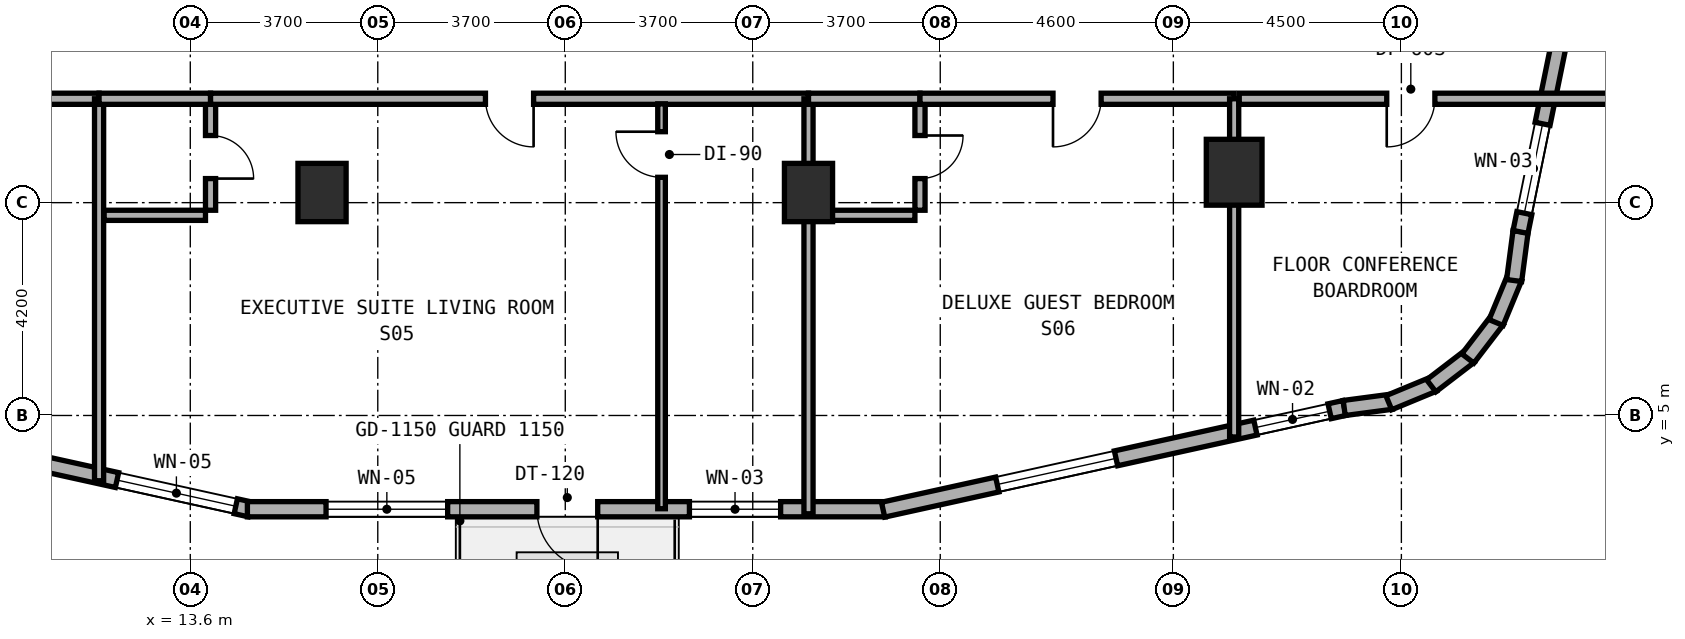
"""IFC4 building model, lengths in metres.
Left out: names, types, materials, properties, quantities, classifications, styles, units other than length and angle.
Written with IfcOpenShell. Run it as: python <this file> out.ifc"""

import sys

from ifc_helpers import new_model, si_unit, direction, frame, frame_2d, origin, origin_2d, place, context, subcontext, project, spatial, rectangle, extrude, element, fill, save


model = new_model("IFC4")
c1 = context("Model", 3, precision=1e-05, world=origin(), true_north=direction((0.0, 1.0)))
c2 = subcontext(c1, "Body", "Model", "MODEL_VIEW")
j1 = project(units=[si_unit("LENGTHUNIT", "METRE"), si_unit("PLANEANGLEUNIT", "RADIAN")], contexts=[c1])
p1 = place(None, origin())
s1 = spatial("IfcSite", under=j1, at=p1, CompositionType="ELEMENT")
p2 = place(p1, origin())
s2 = spatial("IfcBuilding", under=s1, at=p2, CompositionType="ELEMENT")
p3 = place(p2, frame((0.0, 0.0, 48.5)))
s3 = spatial("IfcBuildingStorey", under=s2, at=p3, CompositionType="ELEMENT", Elevation=48.5)
for number, where, z_axis, x_axis in (
    (1, (16.2, 9.4, 0.0), (0.0, 0.0, 1.0), (1.0, 0.0, 0.0)),
    (2, (25.8, 9.4, 0.0), (0.0, 0.0, 1.0), (1.0, 0.0, 0.0)),
):
    element("IfcColumn", number, at=place(p3, frame(where, z_axis=z_axis, x_axis=x_axis)), inside=s3, PredefinedType="COLUMN", context=c2, shape_type="SweptSolid", body=[
        extrude(rectangle(XDim=0.95, YDim=1.15, at=origin_2d()), origin(), (0.0, 0.0, 1.0), 3.5),
    ])
p4 = place(p3, frame((34.2, 9.8, 0.0), z_axis=(0.0, 0.0, 1.0), x_axis=(1.0, 0.0, 0.0)))
e3 = element("IfcColumn", 3, at=p4, inside=s3, PredefinedType="COLUMN", context=c2, shape_type="SweptSolid", body=[
    extrude(rectangle(XDim=1.1, YDim=1.3, at=origin_2d()), origin(), (0.0, 0.0, 1.0), 3.5),
])
p5 = place(p3, frame((5.704, 5.148, 0.0), z_axis=(0.0, 0.0, 1.0), x_axis=(0.976539545934, -0.215338141596, 0.0)))
e4 = element("IfcWall", 4, at=p5, inside=s3, PredefinedType="STANDARD", context=c2, shape_type="SweptSolid", body=[
    extrude(rectangle(XDim=9.288, YDim=0.3, at=frame_2d((4.644, 0.0))), origin(), (0.0, 0.0, 1.0), 3.22),
])
p6 = place(p5, frame((1.856, 0.0, 0.8)))
e5 = element("IfcOpeningElement", 5, at=p6, cuts=e4, PredefinedType="OPENING", context=c2, shape_type="SweptSolid", body=[
    extrude(rectangle(XDim=2.4, YDim=1.6, at=frame_2d((1.2, 0.8))), frame((0.0, 0.16, 0.0), z_axis=(0.0, -1.0, 0.0), x_axis=(1.0, 0.0, 0.0)), (0.0, 0.0, 1.0), 0.32),
])
p7 = place(p5, frame((6.605, 0.0, 0.8)))
e6 = element("IfcOpeningElement", 6, at=p7, cuts=e4, PredefinedType="OPENING", context=c2, shape_type="SweptSolid", body=[
    extrude(rectangle(XDim=2.4, YDim=1.6, at=frame_2d((1.2, 0.8))), frame((0.0, 0.16, 0.0), z_axis=(0.0, -1.0, 0.0), x_axis=(1.0, 0.0, 0.0)), (0.0, 0.0, 1.0), 0.32),
])
p8 = place(p3, frame((14.727, 3.15, 0.0), z_axis=(0.0, 0.0, 1.0), x_axis=(1.0, 0.0, 0.0)))
e7 = element("IfcWall", 7, at=p8, inside=s3, PredefinedType="STANDARD", context=c2, shape_type="SweptSolid", body=[
    extrude(rectangle(XDim=12.591, YDim=0.3, at=frame_2d((6.295, 0.0))), origin(), (0.0, 0.0, 1.0), 3.22),
])
p9 = place(p8, frame((5.713, 0.0, 0.0)))
e8 = element("IfcOpeningElement", 8, at=p9, cuts=e7, PredefinedType="OPENING", context=c2, shape_type="SweptSolid", body=[
    extrude(rectangle(XDim=1.2, YDim=2.15, at=frame_2d((0.6, 1.075))), frame((0.0, 0.16, 0.0), z_axis=(0.0, -1.0, 0.0), x_axis=(1.0, 0.0, 0.0)), (0.0, 0.0, 1.0), 0.32),
])
p10 = place(p8, frame((1.552, 0.0, 0.8)))
e9 = element("IfcOpeningElement", 9, at=p10, cuts=e7, PredefinedType="OPENING", context=c2, shape_type="SweptSolid", body=[
    extrude(rectangle(XDim=2.4, YDim=1.6, at=frame_2d((1.2, 0.8))), frame((0.0, 0.16, 0.0), z_axis=(0.0, -1.0, 0.0), x_axis=(1.0, 0.0, 0.0)), (0.0, 0.0, 1.0), 0.32),
])
p11 = place(p8, frame((8.723, 0.0, 0.85)))
e10 = element("IfcOpeningElement", 10, at=p11, cuts=e7, PredefinedType="OPENING", context=c2, shape_type="SweptSolid", body=[
    extrude(rectangle(XDim=1.8, YDim=1.5, at=frame_2d((0.9, 0.75))), frame((0.0, 0.16, 0.0), z_axis=(0.0, -1.0, 0.0), x_axis=(1.0, 0.0, 0.0)), (0.0, 0.0, 1.0), 0.32),
])
p12 = place(p3, frame((27.272, 3.141, 0.0), z_axis=(0.0, 0.0, 1.0), x_axis=(0.976555357219, 0.21526642629, 0.0)))
e11 = element("IfcWall", 11, at=p12, inside=s3, PredefinedType="STANDARD", context=c2, shape_type="SweptSolid", body=[
    extrude(rectangle(XDim=9.323, YDim=0.3, at=frame_2d((4.661, 0.0))), origin(), (0.0, 0.0, 1.0), 3.22),
])
p13 = place(p12, frame((2.307, 0.0, 0.8)))
e12 = element("IfcOpeningElement", 12, at=p13, cuts=e11, PredefinedType="OPENING", context=c2, shape_type="SweptSolid", body=[
    extrude(rectangle(XDim=2.4, YDim=1.6, at=frame_2d((1.2, 0.8))), frame((0.0, 0.16, 0.0), z_axis=(0.0, -1.0, 0.0), x_axis=(1.0, 0.0, 0.0)), (0.0, 0.0, 1.0), 0.32),
])
p14 = place(p12, frame((7.524, 0.0, 0.85)))
e13 = element("IfcOpeningElement", 13, at=p14, cuts=e11, PredefinedType="OPENING", context=c2, shape_type="SweptSolid", body=[
    extrude(rectangle(XDim=1.5, YDim=1.5, at=frame_2d((0.75, 0.75))), frame((0.0, 0.16, 0.0), z_axis=(0.0, -1.0, 0.0), x_axis=(1.0, 0.0, 0.0)), (0.0, 0.0, 1.0), 0.32),
])
p15 = place(p3, frame((36.372, 5.148, 0.0), z_axis=(0.0, 0.0, 1.0), x_axis=(0.991359246108, 0.131174864804, 0.0)))
e14 = element("IfcWall", 14, at=p15, inside=s3, PredefinedType="STANDARD", context=c2, shape_type="SweptSolid", body=[
    extrude(rectangle(XDim=0.938, YDim=0.3, at=frame_2d((0.469, 0.0))), origin(), (0.0, 0.0, 1.0), 3.22),
])
p16 = place(p3, frame((37.252, 5.252, 0.0), z_axis=(0.0, 0.0, 1.0), x_axis=(0.924019948111, 0.382344263057, 0.0)))
e15 = element("IfcWall", 15, at=p16, inside=s3, PredefinedType="STANDARD", context=c2, shape_type="SweptSolid", body=[
    extrude(rectangle(XDim=0.955, YDim=0.3, at=frame_2d((0.477, 0.0))), origin(), (0.0, 0.0, 1.0), 3.22),
])
p17 = place(p3, frame((38.089, 5.586, 0.0), z_axis=(0.0, 0.0, 1.0), x_axis=(0.793573440799, 0.608474481025, 0.0)))
e16 = element("IfcWall", 16, at=p17, inside=s3, PredefinedType="STANDARD", context=c2, shape_type="SweptSolid", body=[
    extrude(rectangle(XDim=0.955, YDim=0.3, at=frame_2d((0.478, 0.0))), origin(), (0.0, 0.0, 1.0), 3.22),
])
p18 = place(p3, frame((38.812, 6.125, 0.0), z_axis=(0.0, 0.0, 1.0), x_axis=(0.608351047625, 0.793668068435, 0.0)))
e17 = element("IfcWall", 17, at=p18, inside=s3, PredefinedType="STANDARD", context=c2, shape_type="SweptSolid", body=[
    extrude(rectangle(XDim=0.955, YDim=0.3, at=frame_2d((0.478, 0.0))), origin(), (0.0, 0.0, 1.0), 3.22),
])
p19 = place(p3, frame((39.369, 6.834, 0.0), z_axis=(0.0, 0.0, 1.0), x_axis=(0.382344263057, 0.924019948111, 0.0)))
e18 = element("IfcWall", 18, at=p19, inside=s3, PredefinedType="STANDARD", context=c2, shape_type="SweptSolid", body=[
    extrude(rectangle(XDim=0.955, YDim=0.3, at=frame_2d((0.477, 0.0))), origin(), (0.0, 0.0, 1.0), 3.22),
])
p20 = place(p3, frame((39.725, 7.663, 0.0), z_axis=(0.0, 0.0, 1.0), x_axis=(0.130454512571, 0.991454295543, 0.0)))
e19 = element("IfcWall", 19, at=p20, inside=s3, PredefinedType="STANDARD", context=c2, shape_type="SweptSolid", body=[
    extrude(rectangle(XDim=0.973, YDim=0.3, at=frame_2d((0.487, 0.0))), origin(), (0.0, 0.0, 1.0), 3.22),
])
p21 = place(p3, frame((39.851, 8.622, 0.0), z_axis=(0.0, 0.0, 1.0), x_axis=(0.199990901713, 0.979797754249, 0.0)))
e20 = element("IfcWall", 20, at=p21, inside=s3, PredefinedType="STANDARD", context=c2, shape_type="SweptSolid", body=[
    extrude(rectangle(XDim=10.065, YDim=0.3, at=frame_2d((5.033, 0.0))), origin(), (0.0, 0.0, 1.0), 3.22),
])
p22 = place(p21, frame((0.378, 0.0, 0.85)))
e21 = element("IfcOpeningElement", 21, at=p22, cuts=e20, PredefinedType="OPENING", context=c2, shape_type="SweptSolid", body=[
    extrude(rectangle(XDim=1.8, YDim=1.5, at=frame_2d((0.9, 0.75))), frame((0.0, 0.16, 0.0), z_axis=(0.0, -1.0, 0.0), x_axis=(1.0, 0.0, 0.0)), (0.0, 0.0, 1.0), 0.32),
])
p23 = place(p21, frame((5.236, 0.0, 0.8)))
e22 = element("IfcOpeningElement", 22, at=p23, cuts=e20, PredefinedType="OPENING", context=c2, shape_type="SweptSolid", body=[
    extrude(rectangle(XDim=2.4, YDim=1.6, at=frame_2d((1.2, 0.8))), frame((0.0, 0.16, 0.0), z_axis=(0.0, -1.0, 0.0), x_axis=(1.0, 0.0, 0.0)), (0.0, 0.0, 1.0), 0.32),
])
p24 = place(p3, frame((5.55, 11.25, 0.0), z_axis=(0.0, 0.0, 1.0), x_axis=(1.0, 0.0, 0.0)))
e23 = element("IfcWall", 23, at=p24, inside=s3, PredefinedType="SOLIDWALL", context=c2, shape_type="SweptSolid", body=[
    extrude(rectangle(XDim=6.25, YDim=0.22, at=frame_2d((3.125, 0.0))), origin(), (0.0, 0.0, 1.0), 2.395),
])
p25 = place(p24, frame((3.21, 0.0, 0.0)))
e24 = element("IfcOpeningElement", 24, at=p25, cuts=e23, PredefinedType="OPENING", context=c2, shape_type="SweptSolid", body=[
    extrude(rectangle(XDim=0.95, YDim=2.1, at=frame_2d((0.475, 1.05))), frame((0.0, 0.12, 0.0), z_axis=(0.0, -1.0, 0.0), x_axis=(1.0, 0.0, 0.0)), (0.0, 0.0, 1.0), 0.24),
])
p26 = place(p3, frame((11.8, 3.712, 0.0), z_axis=(0.0, 0.0, 1.0), x_axis=(0.0, 1.0, 0.0)))
e25 = element("IfcWall", 25, at=p26, inside=s3, PredefinedType="SOLIDWALL", context=c2, shape_type="SweptSolid", body=[
    extrude(rectangle(XDim=7.538, YDim=0.18, at=frame_2d((3.769, 0.0))), origin(), (0.0, 0.0, 1.0), 2.745),
])
p27 = place(p3, frame((14.0, 9.05, 0.0), z_axis=(0.0, 0.0, 1.0), x_axis=(0.0, 1.0, 0.0)))
e26 = element("IfcWall", 26, at=p27, inside=s3, PredefinedType="PLUMBINGWALL", context=c2, shape_type="SweptSolid", body=[
    extrude(rectangle(XDim=2.1, YDim=0.2, at=frame_2d((1.05, 0.0))), origin(), (0.0, 0.0, 1.0), 2.745),
])
p28 = place(p27, frame((0.625, 0.0, 0.0)))
e27 = element("IfcOpeningElement", 27, at=p28, cuts=e26, PredefinedType="OPENING", context=c2, shape_type="SweptSolid", body=[
    extrude(rectangle(XDim=0.85, YDim=2.1, at=frame_2d((0.425, 1.05))), frame((0.0, 0.11, 0.0), z_axis=(0.0, -1.0, 0.0), x_axis=(1.0, 0.0, 0.0)), (0.0, 0.0, 1.0), 0.22),
])
p29 = place(p3, frame((11.9, 8.95, 0.0), z_axis=(0.0, 0.0, 1.0), x_axis=(1.0, 0.0, 0.0)))
e28 = element("IfcWall", 28, at=p29, inside=s3, PredefinedType="PLUMBINGWALL", context=c2, shape_type="SweptSolid", body=[
    extrude(rectangle(XDim=2.0, YDim=0.2, at=frame_2d((1.0, 0.0))), origin(), (0.0, 0.0, 1.0), 3.22),
])
p30 = place(p3, frame((11.8, 11.25, 0.0), z_axis=(0.0, 0.0, 1.0), x_axis=(1.0, 0.0, 0.0)))
e29 = element("IfcWall", 29, at=p30, inside=s3, PredefinedType="SOLIDWALL", context=c2, shape_type="SweptSolid", body=[
    extrude(rectangle(XDim=2.2, YDim=0.22, at=frame_2d((1.1, 0.0))), origin(), (0.0, 0.0, 1.0), 2.955),
])
p31 = place(p3, frame((14.0, 11.25, 0.0), z_axis=(0.0, 0.0, 1.0), x_axis=(1.0, 0.0, 0.0)))
e30 = element("IfcWall", 30, at=p31, inside=s3, PredefinedType="SOLIDWALL", context=c2, shape_type="SweptSolid", body=[
    extrude(rectangle(XDim=11.8, YDim=0.22, at=frame_2d((5.9, 0.0))), origin(), (0.0, 0.0, 1.0), 2.395),
])
p32 = place(p31, frame((5.425, 0.0, 0.0)))
e31 = element("IfcOpeningElement", 31, at=p32, cuts=e30, PredefinedType="OPENING", context=c2, shape_type="SweptSolid", body=[
    extrude(rectangle(XDim=0.95, YDim=2.1, at=frame_2d((0.475, 1.05))), frame((0.0, 0.12, 0.0), z_axis=(0.0, -1.0, 0.0), x_axis=(1.0, 0.0, 0.0)), (0.0, 0.0, 1.0), 0.24),
])
p33 = place(p3, frame((22.9, 3.16, 0.0), z_axis=(0.0, 0.0, 1.0), x_axis=(0.0, 1.0, 0.0)))
e32 = element("IfcWall", 32, at=p33, inside=s3, PredefinedType="PARTITIONING", context=c2, shape_type="SweptSolid", body=[
    extrude(rectangle(XDim=7.99, YDim=0.15, at=frame_2d((3.995, 0.0))), origin(), (0.0, 0.0, 1.0), 2.745),
])
p34 = place(p33, frame((6.54, 0.0, 0.0)))
e33 = element("IfcOpeningElement", 33, at=p34, cuts=e32, PredefinedType="OPENING", context=c2, shape_type="SweptSolid", body=[
    extrude(rectangle(XDim=0.9, YDim=2.1, at=frame_2d((0.45, 1.05))), frame((0.0, 0.085, 0.0), z_axis=(0.0, -1.0, 0.0), x_axis=(1.0, 0.0, 0.0)), (0.0, 0.0, 1.0), 0.17),
])
p35 = place(p3, frame((25.8, 3.06, 0.0), z_axis=(0.0, 0.0, 1.0), x_axis=(0.0, 1.0, 0.0)))
e34 = element("IfcWall", 34, at=p35, inside=s3, PredefinedType="SOLIDWALL", context=c2, shape_type="SweptSolid", body=[
    extrude(rectangle(XDim=8.19, YDim=0.18, at=frame_2d((4.095, 0.0))), origin(), (0.0, 0.0, 1.0), 2.395),
])
p36 = place(p3, frame((28.0, 9.05, 0.0), z_axis=(0.0, 0.0, 1.0), x_axis=(0.0, 1.0, 0.0)))
e35 = element("IfcWall", 35, at=p36, inside=s3, PredefinedType="PLUMBINGWALL", context=c2, shape_type="SweptSolid", body=[
    extrude(rectangle(XDim=2.1, YDim=0.2, at=frame_2d((1.05, 0.0))), origin(), (0.0, 0.0, 1.0), 2.745),
])
p37 = place(p36, frame((0.625, 0.0, 0.0)))
e36 = element("IfcOpeningElement", 36, at=p37, cuts=e35, PredefinedType="OPENING", context=c2, shape_type="SweptSolid", body=[
    extrude(rectangle(XDim=0.85, YDim=2.1, at=frame_2d((0.425, 1.05))), frame((0.0, 0.11, 0.0), z_axis=(0.0, -1.0, 0.0), x_axis=(1.0, 0.0, 0.0)), (0.0, 0.0, 1.0), 0.22),
])
p38 = place(p3, frame((25.9, 8.95, 0.0), z_axis=(0.0, 0.0, 1.0), x_axis=(1.0, 0.0, 0.0)))
e37 = element("IfcWall", 37, at=p38, inside=s3, PredefinedType="PLUMBINGWALL", context=c2, shape_type="SweptSolid", body=[
    extrude(rectangle(XDim=2.0, YDim=0.2, at=frame_2d((1.0, 0.0))), origin(), (0.0, 0.0, 1.0), 3.22),
])
p39 = place(p3, frame((25.8, 11.25, 0.0), z_axis=(0.0, 0.0, 1.0), x_axis=(1.0, 0.0, 0.0)))
e38 = element("IfcWall", 38, at=p39, inside=s3, PredefinedType="SOLIDWALL", context=c2, shape_type="SweptSolid", body=[
    extrude(rectangle(XDim=2.2, YDim=0.22, at=frame_2d((1.1, 0.0))), origin(), (0.0, 0.0, 1.0), 2.395),
])
p40 = place(p3, frame((28.0, 11.25, 0.0), z_axis=(0.0, 0.0, 1.0), x_axis=(1.0, 0.0, 0.0)))
e39 = element("IfcWall", 39, at=p40, inside=s3, PredefinedType="SOLIDWALL", context=c2, shape_type="SweptSolid", body=[
    extrude(rectangle(XDim=6.2, YDim=0.22, at=frame_2d((3.1, 0.0))), origin(), (0.0, 0.0, 1.0), 2.395),
])
p41 = place(p40, frame((2.625, 0.0, 0.0)))
e40 = element("IfcOpeningElement", 40, at=p41, cuts=e39, PredefinedType="OPENING", context=c2, shape_type="SweptSolid", body=[
    extrude(rectangle(XDim=0.95, YDim=2.1, at=frame_2d((0.475, 1.05))), frame((0.0, 0.12, 0.0), z_axis=(0.0, -1.0, 0.0), x_axis=(1.0, 0.0, 0.0)), (0.0, 0.0, 1.0), 0.24),
])
p42 = place(p3, frame((34.2, 4.576, 0.0), z_axis=(0.0, 0.0, 1.0), x_axis=(0.0, 1.0, 0.0)))
e41 = element("IfcWall", 41, at=p42, inside=s3, PredefinedType="SOLIDWALL", context=c2, shape_type="SweptSolid", body=[
    extrude(rectangle(XDim=6.674, YDim=0.18, at=frame_2d((3.337, 0.0))), origin(), (0.0, 0.0, 1.0), 2.395),
])
p43 = place(p3, frame((34.3, 11.25, 0.0), z_axis=(0.0, 0.0, 1.0), x_axis=(1.0, 0.0, 0.0)))
e42 = element("IfcWall", 42, at=p43, inside=s3, PredefinedType="SOLIDWALL", context=c2, shape_type="SweptSolid", body=[
    extrude(rectangle(XDim=7.44, YDim=0.22, at=frame_2d((3.72, 0.0))), origin(), (0.0, 0.0, 1.0), 2.745),
])
p44 = place(p43, frame((2.911, 0.0, 0.0)))
e43 = element("IfcOpeningElement", 43, at=p44, cuts=e42, PredefinedType="OPENING", context=c2, shape_type="SweptSolid", body=[
    extrude(rectangle(XDim=0.95, YDim=2.1, at=frame_2d((0.475, 1.05))), frame((0.0, 0.12, 0.0), z_axis=(0.0, -1.0, 0.0), x_axis=(1.0, 0.0, 0.0)), (0.0, 0.0, 1.0), 0.24),
])
p45 = place(p7, origin())
e44 = element("IfcWindow", 44, at=p45, inside=s3, PartitioningType="SINGLE_PANEL", PredefinedType="WINDOW", context=c2, shape_type="SweptSolid", body=[
    extrude(rectangle(XDim=2.4, YDim=1.6, at=frame_2d((1.2, 0.8))), frame((0.0, 0.03, 0.0), z_axis=(0.0, -1.0, 0.0), x_axis=(1.0, 0.0, 0.0)), (0.0, 0.0, 1.0), 0.06),
])
fill(e6, e44)
p46 = place(p9, frame((1.2, 0.0, 0.0), z_axis=(0.0, 0.0, 1.0), x_axis=(-1.0, 0.0, 0.0)))
e45 = element("IfcDoor", 45, at=p46, inside=s3, OperationType="SINGLE_SWING_LEFT", PredefinedType="DOOR", context=c2, shape_type="SweptSolid", body=[
    extrude(rectangle(XDim=1.2, YDim=2.15, at=frame_2d((0.6, 1.075))), frame((0.0, 0.025, 0.0), z_axis=(0.0, -1.0, 0.0), x_axis=(1.0, 0.0, 0.0)), (0.0, 0.0, 1.0), 0.05),
])
fill(e8, e45)
p47 = place(p10, origin())
e46 = element("IfcWindow", 46, at=p47, inside=s3, PartitioningType="SINGLE_PANEL", PredefinedType="WINDOW", context=c2, shape_type="SweptSolid", body=[
    extrude(rectangle(XDim=2.4, YDim=1.6, at=frame_2d((1.2, 0.8))), frame((0.0, 0.03, 0.0), z_axis=(0.0, -1.0, 0.0), x_axis=(1.0, 0.0, 0.0)), (0.0, 0.0, 1.0), 0.06),
])
fill(e9, e46)
p48 = place(p11, origin())
e47 = element("IfcWindow", 47, at=p48, inside=s3, PartitioningType="SINGLE_PANEL", PredefinedType="WINDOW", context=c2, shape_type="SweptSolid", body=[
    extrude(rectangle(XDim=1.8, YDim=1.5, at=frame_2d((0.9, 0.75))), frame((0.0, 0.03, 0.0), z_axis=(0.0, -1.0, 0.0), x_axis=(1.0, 0.0, 0.0)), (0.0, 0.0, 1.0), 0.06),
])
fill(e10, e47)
p49 = place(p13, origin())
e48 = element("IfcWindow", 48, at=p49, inside=s3, PartitioningType="SINGLE_PANEL", PredefinedType="WINDOW", context=c2, shape_type="SweptSolid", body=[
    extrude(rectangle(XDim=2.4, YDim=1.6, at=frame_2d((1.2, 0.8))), frame((0.0, 0.03, 0.0), z_axis=(0.0, -1.0, 0.0), x_axis=(1.0, 0.0, 0.0)), (0.0, 0.0, 1.0), 0.06),
])
fill(e12, e48)
p50 = place(p14, origin())
e49 = element("IfcWindow", 49, at=p50, inside=s3, PartitioningType="SINGLE_PANEL", PredefinedType="WINDOW", context=c2, shape_type="SweptSolid", body=[
    extrude(rectangle(XDim=1.5, YDim=1.5, at=frame_2d((0.75, 0.75))), frame((0.0, 0.03, 0.0), z_axis=(0.0, -1.0, 0.0), x_axis=(1.0, 0.0, 0.0)), (0.0, 0.0, 1.0), 0.06),
])
fill(e13, e49)
p51 = place(p22, origin())
e50 = element("IfcWindow", 50, at=p51, inside=s3, PartitioningType="SINGLE_PANEL", PredefinedType="WINDOW", context=c2, shape_type="SweptSolid", body=[
    extrude(rectangle(XDim=1.8, YDim=1.5, at=frame_2d((0.9, 0.75))), frame((0.0, 0.03, 0.0), z_axis=(0.0, -1.0, 0.0), x_axis=(1.0, 0.0, 0.0)), (0.0, 0.0, 1.0), 0.06),
])
fill(e21, e50)
p52 = place(p28, frame((0.85, 0.0, 0.0), z_axis=(0.0, 0.0, 1.0), x_axis=(-1.0, 0.0, 0.0)))
e51 = element("IfcDoor", 51, at=p52, inside=s3, OperationType="SINGLE_SWING_RIGHT", PredefinedType="DOOR", context=c2, shape_type="SweptSolid", body=[
    extrude(rectangle(XDim=0.85, YDim=2.1, at=frame_2d((0.425, 1.05))), frame((0.0, 0.025, 0.0), z_axis=(0.0, -1.0, 0.0), x_axis=(1.0, 0.0, 0.0)), (0.0, 0.0, 1.0), 0.05),
])
fill(e27, e51)
p53 = place(p32, frame((0.95, 0.0, 0.0), z_axis=(0.0, 0.0, 1.0), x_axis=(-1.0, 0.0, 0.0)))
e52 = element("IfcDoor", 52, at=p53, inside=s3, OperationType="SINGLE_SWING_LEFT", PredefinedType="DOOR", context=c2, shape_type="SweptSolid", body=[
    extrude(rectangle(XDim=0.95, YDim=2.1, at=frame_2d((0.475, 1.05))), frame((0.0, 0.025, 0.0), z_axis=(0.0, -1.0, 0.0), x_axis=(1.0, 0.0, 0.0)), (0.0, 0.0, 1.0), 0.05),
])
fill(e31, e52)
p54 = place(p34, origin())
e53 = element("IfcDoor", 53, at=p54, inside=s3, OperationType="SINGLE_SWING_RIGHT", PredefinedType="DOOR", context=c2, shape_type="SweptSolid", body=[
    extrude(rectangle(XDim=0.9, YDim=2.1, at=frame_2d((0.45, 1.05))), frame((0.0, 0.025, 0.0), z_axis=(0.0, -1.0, 0.0), x_axis=(1.0, 0.0, 0.0)), (0.0, 0.0, 1.0), 0.05),
])
fill(e33, e53)
p55 = place(p37, frame((0.85, 0.0, 0.0), z_axis=(0.0, 0.0, 1.0), x_axis=(-1.0, 0.0, 0.0)))
e54 = element("IfcDoor", 54, at=p55, inside=s3, OperationType="SINGLE_SWING_LEFT", PredefinedType="DOOR", context=c2, shape_type="SweptSolid", body=[
    extrude(rectangle(XDim=0.85, YDim=2.1, at=frame_2d((0.425, 1.05))), frame((0.0, 0.025, 0.0), z_axis=(0.0, -1.0, 0.0), x_axis=(1.0, 0.0, 0.0)), (0.0, 0.0, 1.0), 0.05),
])
fill(e36, e54)
p56 = place(p41, frame((0.95, 0.0, 0.0), z_axis=(0.0, 0.0, 1.0), x_axis=(-1.0, 0.0, 0.0)))
e55 = element("IfcDoor", 55, at=p56, inside=s3, OperationType="SINGLE_SWING_RIGHT", PredefinedType="DOOR", context=c2, shape_type="SweptSolid", body=[
    extrude(rectangle(XDim=0.95, YDim=2.1, at=frame_2d((0.475, 1.05))), frame((0.0, 0.025, 0.0), z_axis=(0.0, -1.0, 0.0), x_axis=(1.0, 0.0, 0.0)), (0.0, 0.0, 1.0), 0.05),
])
fill(e40, e55)
p57 = place(p44, frame((0.95, 0.0, 0.0), z_axis=(0.0, 0.0, 1.0), x_axis=(-1.0, 0.0, 0.0)))
e56 = element("IfcDoor", 56, at=p57, inside=s3, OperationType="SINGLE_SWING_RIGHT", PredefinedType="DOOR", context=c2, shape_type="SweptSolid", body=[
    extrude(rectangle(XDim=0.95, YDim=2.1, at=frame_2d((0.475, 1.05))), frame((0.0, 0.025, 0.0), z_axis=(0.0, -1.0, 0.0), x_axis=(1.0, 0.0, 0.0)), (0.0, 0.0, 1.0), 0.05),
])
fill(e43, e56)
save(model, sys.argv[1])
